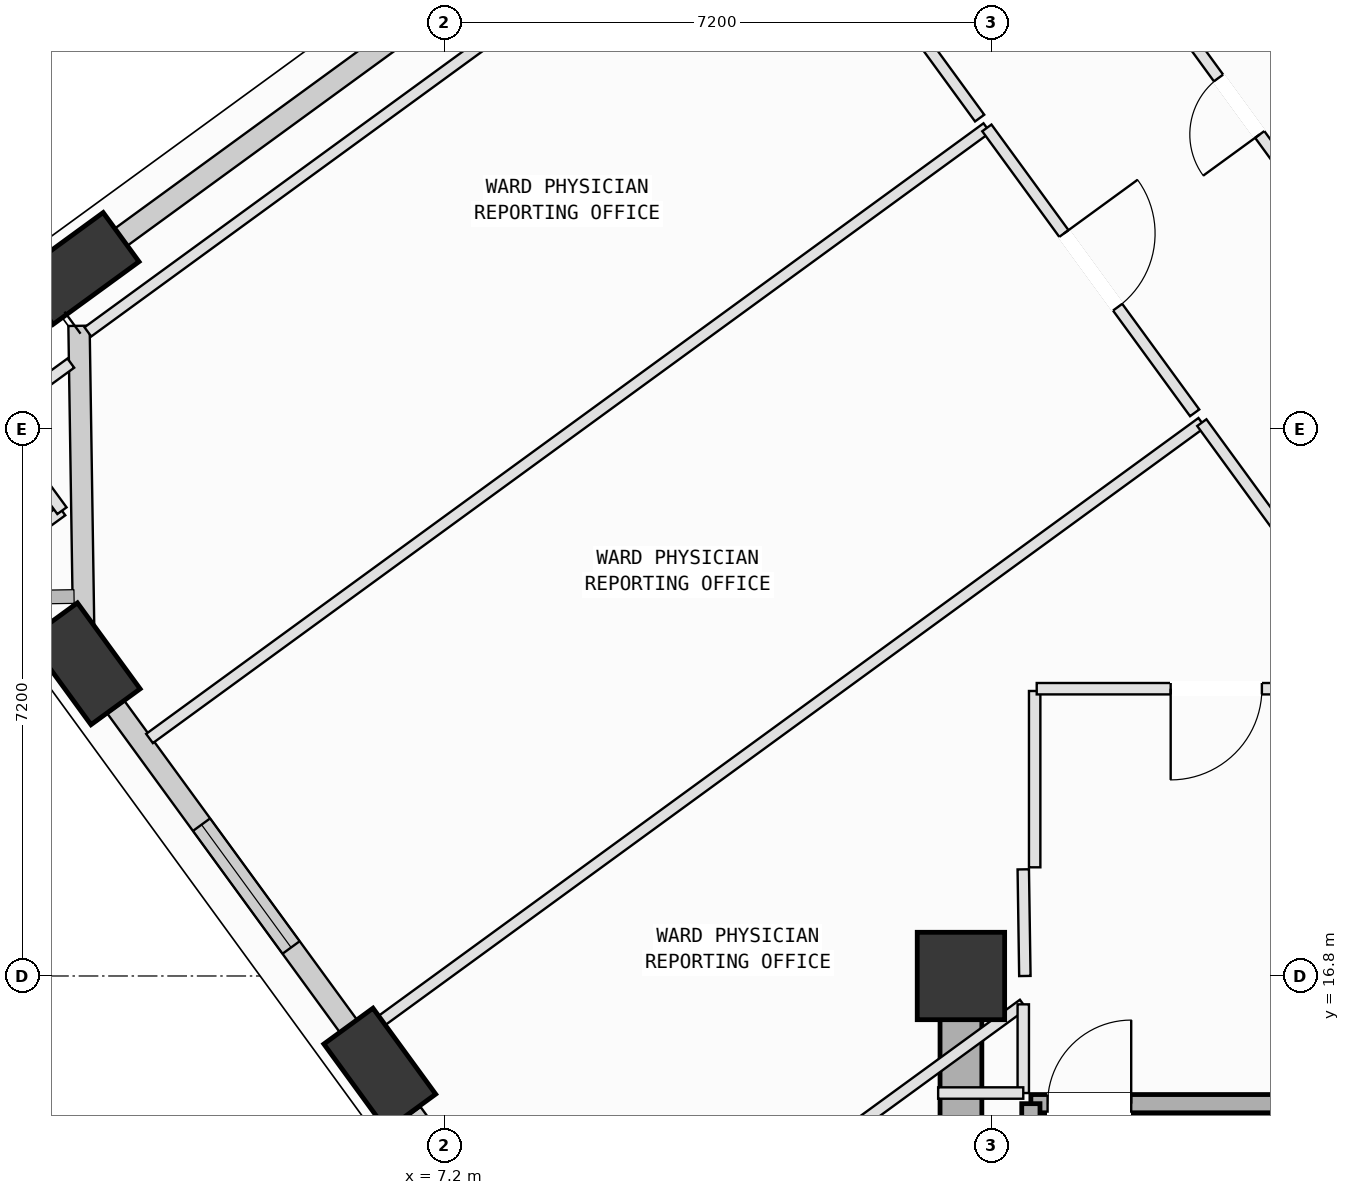
"""IFC4 building model, lengths in metres.
Left out: names, types, materials, properties, quantities, classifications, styles, units other than length and angle.
Written with IfcOpenShell. Run it as: python <this file> out.ifc"""

import sys

from ifc_helpers import new_model, si_unit, direction, frame, frame_2d, origin, origin_2d, place, context, subcontext, project, spatial, rectangle, extrude, element, fill, save


model = new_model("IFC4")
c1 = context("Model", 3, precision=1e-05, world=origin(), true_north=direction((0.0, 1.0)))
c2 = subcontext(c1, "Body", "Model", "MODEL_VIEW")
j1 = project(units=[si_unit("LENGTHUNIT", "METRE"), si_unit("PLANEANGLEUNIT", "RADIAN")], contexts=[c1])
p1 = place(None, origin())
s1 = spatial("IfcSite", under=j1, at=p1, CompositionType="ELEMENT")
p2 = place(p1, origin())
s2 = spatial("IfcBuilding", under=s1, at=p2, CompositionType="ELEMENT")
p3 = place(p2, frame((0.0, 0.0, 177.8)))
s3 = spatial("IfcBuildingStorey", under=s2, at=p3, CompositionType="ELEMENT", Elevation=177.8)
p4 = place(p3, frame((14.0, 16.8, 0.0), z_axis=(0.0, 0.0, 1.0), x_axis=(1.0, 0.0, 0.0)))
e1 = element("IfcColumn", 1, at=p4, inside=s3, PredefinedType="COLUMN", context=c2, shape_type="SweptSolid", body=[
    extrude(rectangle(XDim=1.15, YDim=1.15, at=origin_2d()), origin(), (0.0, 0.0, 1.0), 4.0),
])
p5 = place(p3, frame((2.385, 26.109, 0.002), z_axis=(-0.004301534601, -0.128379603084, 0.991715772947), x_axis=(0.827104014737, 0.556929973682, 0.075683242671)))
e2 = element("IfcColumn", 2, at=p5, inside=s3, PredefinedType="COLUMN", context=c2, shape_type="SweptSolid", body=[
    extrude(rectangle(XDim=1.4, YDim=0.8, at=origin_2d()), origin(), (0.0, 0.0, 1.0), 4.03),
])
p6 = place(p3, frame((2.465, 20.908, 0.002), z_axis=(0.017083826497, -0.127825794003, 0.991649489114), x_axis=(-0.690145428743, 0.716129588878, 0.104200283673)))
e3 = element("IfcColumn", 3, at=p6, inside=s3, PredefinedType="COLUMN", context=c2, shape_type="SweptSolid", body=[
    extrude(rectangle(XDim=1.4, YDim=0.8, at=origin_2d()), origin(), (0.0, 0.0, 1.0), 4.03),
])
p7 = place(p3, frame((6.354, 15.575, 0.002), z_axis=(0.03888408662, -0.111799331733, 0.992969756454), x_axis=(-0.820057422321, 0.564232872721, 0.095640417382)))
e4 = element("IfcColumn", 4, at=p7, inside=s3, PredefinedType="COLUMN", context=c2, shape_type="SweptSolid", body=[
    extrude(rectangle(XDim=1.4, YDim=0.8, at=origin_2d()), origin(), (0.0, 0.0, 1.0), 4.025),
])
p8 = place(p3, frame((17.236, 32.747, 0.0), z_axis=(0.0, 0.0, 1.0), x_axis=(0.589164046523, -0.808013444371, 0.0)))
e5 = element("IfcWall", 5, at=p8, inside=s3, PredefinedType="SOLIDWALL", context=c2, shape_type="SweptSolid", body=[
    extrude(rectangle(XDim=6.96, YDim=0.24, at=frame_2d((3.48, 0.0))), origin(), (0.0, 0.0, 1.0), 3.265),
])
p9 = place(p8, frame((3.152, 0.0, 0.0)))
e6 = element("IfcOpeningElement", 6, at=p9, cuts=e5, PredefinedType="OPENING", context=c2, shape_type="SweptSolid", body=[
    extrude(rectangle(XDim=1.1, YDim=2.15, at=frame_2d((0.55, 1.075))), frame((0.0, 0.13, 0.0), z_axis=(0.0, -1.0, 0.0), x_axis=(1.0, 0.0, 0.0)), (0.0, 0.0, 1.0), 0.26),
])
p10 = place(p3, frame((2.621, 26.282, 0.0), z_axis=(0.0, 0.0, 1.0), x_axis=(0.807987546016, 0.589199563377, 0.0)))
e7 = element("IfcWall", 7, at=p10, inside=s3, PredefinedType="SOLIDWALL", context=c2, shape_type="SweptSolid", body=[
    extrude(rectangle(XDim=7.27, YDim=0.28, at=frame_2d((3.635, 0.0))), origin(), (0.0, 0.0, 1.0), 3.265),
])
p11 = place(p3, frame((2.461, 21.145, 0.0), z_axis=(0.0, 0.0, 1.0), x_axis=(-0.015365849783, 0.999881938361, 0.0)))
e8 = element("IfcWall", 8, at=p11, inside=s3, PredefinedType="SOLIDWALL", context=c2, shape_type="SweptSolid", body=[
    extrude(rectangle(XDim=4.21, YDim=0.28, at=frame_2d((2.105, 0.0))), origin(), (0.0, 0.0, 1.0), 3.265),
])
p12 = place(p3, frame((6.198, 15.788, 0.0), z_axis=(0.0, 0.0, 1.0), x_axis=(-0.589159176224, 0.808016995534, 0.0)))
e9 = element("IfcWall", 9, at=p12, inside=s3, PredefinedType="SOLIDWALL", context=c2, shape_type="SweptSolid", body=[
    extrude(rectangle(XDim=5.628, YDim=0.28, at=frame_2d((2.814, 0.0))), origin(), (0.0, 0.0, 1.0), 3.265),
])
p13 = place(p12, frame((1.717, 0.0, 0.75)))
e10 = element("IfcOpeningElement", 10, at=p13, cuts=e9, PredefinedType="OPENING", context=c2, shape_type="SweptSolid", body=[
    extrude(rectangle(XDim=2.0, YDim=1.95, at=frame_2d((1.0, 0.975))), frame((0.0, 0.15, 0.0), z_axis=(0.0, -1.0, 0.0), x_axis=(1.0, 0.0, 0.0)), (0.0, 0.0, 1.0), 0.3),
])
p14 = place(p3, frame((10.114, 10.419, 0.0), z_axis=(0.0, 0.0, 1.0), x_axis=(-0.589176262837, 0.808004536688, 0.0)))
e11 = element("IfcWall", 11, at=p14, inside=s3, PredefinedType="SOLIDWALL", context=c2, shape_type="SweptSolid", body=[
    extrude(rectangle(XDim=5.662, YDim=0.28, at=frame_2d((2.831, 0.0))), origin(), (0.0, 0.0, 1.0), 3.265),
])
p15 = place(p14, frame((3.356, 0.0, 0.75)))
e12 = element("IfcOpeningElement", 12, at=p15, cuts=e11, PredefinedType="OPENING", context=c2, shape_type="SweptSolid", body=[
    extrude(rectangle(XDim=1.4, YDim=1.85, at=frame_2d((0.7, 0.925))), frame((0.0, 0.15, 0.0), z_axis=(0.0, -1.0, 0.0), x_axis=(1.0, 0.0, 0.0)), (0.0, 0.0, 1.0), 0.3),
])
p16 = place(p3, frame((14.92, 15.12, 0.0), z_axis=(0.0, 0.0, 1.0), x_axis=(1.0, 0.0, 0.0)))
e13 = element("IfcWall", 13, at=p16, inside=s3, PredefinedType="SOLIDWALL", context=c2, shape_type="SweptSolid", body=[
    extrude(rectangle(XDim=3.46, YDim=0.24, at=frame_2d((1.73, 0.0))), origin(), (0.0, 0.0, 1.0), 3.78),
])
p17 = place(p16, frame((0.22, 0.0, 0.0)))
e14 = element("IfcOpeningElement", 14, at=p17, cuts=e13, PredefinedType="OPENING", context=c2, shape_type="SweptSolid", body=[
    extrude(rectangle(XDim=1.1, YDim=2.15, at=frame_2d((0.55, 1.075))), frame((0.0, 0.13, 0.0), z_axis=(0.0, -1.0, 0.0), x_axis=(1.0, 0.0, 0.0)), (0.0, 0.0, 1.0), 0.26),
])
p18 = place(p3, frame((14.92, 8.075, 0.0), z_axis=(0.0, 0.0, 1.0), x_axis=(0.0, 1.0, 0.0)))
e15 = element("IfcWall", 15, at=p18, inside=s3, PredefinedType="SOLIDWALL", context=c2, shape_type="SweptSolid", body=[
    extrude(rectangle(XDim=7.045, YDim=0.24, at=frame_2d((3.522, 0.0))), origin(), (0.0, 0.0, 1.0), 3.78),
])
p19 = place(p3, frame((14.0, 16.8, 0.0), z_axis=(0.0, 0.0, 1.0), x_axis=(0.0, -1.0, 0.0)))
e16 = element("IfcWall", 16, at=p19, inside=s3, PredefinedType="SHEAR", context=c2, shape_type="SweptSolid", body=[
    extrude(rectangle(XDim=9.0, YDim=0.55, at=frame_2d((4.5, 0.0))), origin(), (0.0, 0.0, 1.0), 3.78),
])
p20 = place(p3, frame((8.98, 12.169, 0.0), z_axis=(0.0, 0.0, 1.0), x_axis=(0.808029975649, 0.58914137391, 0.0)))
e17 = element("IfcWall", 17, at=p20, inside=s3, PredefinedType="PARTITIONING", context=c2, shape_type="SweptSolid", body=[
    extrude(rectangle(XDim=7.228, YDim=0.15, at=frame_2d((3.614, 0.0))), origin(), (0.0, 0.0, 1.0), 3.78),
])
p21 = place(p20, frame((3.114, 0.0, 0.0)))
e18 = element("IfcOpeningElement", 18, at=p21, cuts=e17, PredefinedType="OPENING", context=c2, shape_type="SweptSolid", body=[
    extrude(rectangle(XDim=1.0, YDim=2.12, at=frame_2d((0.5, 1.06))), frame((0.0, 0.085, 0.0), z_axis=(0.0, -1.0, 0.0), x_axis=(1.0, 0.0, 0.0)), (0.0, 0.0, 1.0), 0.17),
])
p22 = place(p3, frame((14.82, 16.427, 0.0), z_axis=(0.0, 0.0, 1.0), x_axis=(0.0, -1.0, 0.0)))
e19 = element("IfcWall", 19, at=p22, inside=s3, PredefinedType="PARTITIONING", context=c2, shape_type="SweptSolid", body=[
    extrude(rectangle(XDim=1.167, YDim=0.15, at=frame_2d((0.583, 0.0))), origin(), (0.0, 0.0, 1.0), 3.78),
])
p23 = place(p3, frame((14.82, 15.26, 0.0), z_axis=(0.0, 0.0, 1.0), x_axis=(-1.0, 0.0, 0.0)))
e20 = element("IfcWall", 20, at=p23, inside=s3, PredefinedType="PARTITIONING", context=c2, shape_type="SweptSolid", body=[
    extrude(rectangle(XDim=1.12, YDim=0.15, at=frame_2d((0.56, 0.0))), origin(), (0.0, 0.0, 1.0), 3.78),
])
p24 = place(p3, frame((14.97, 20.55, 0.0), z_axis=(0.0, 0.0, 1.0), x_axis=(0.0, -1.0, 0.0)))
e21 = element("IfcWall", 21, at=p24, inside=s3, PredefinedType="PARTITIONING", context=c2, shape_type="SweptSolid", body=[
    extrude(rectangle(XDim=2.32, YDim=0.15, at=frame_2d((1.16, 0.0))), origin(), (0.0, 0.0, 1.0), 3.78),
])
p25 = place(p3, frame((14.82, 18.203, 0.0), z_axis=(0.0, 0.0, 1.0), x_axis=(0.014965257436, -0.999888014265, 0.0)))
e22 = element("IfcWall", 22, at=p25, inside=s3, PredefinedType="PARTITIONING", context=c2, shape_type="SweptSolid", body=[
    extrude(rectangle(XDim=1.403, YDim=0.15, at=frame_2d((0.702, 0.0))), origin(), (0.0, 0.0, 1.0), 3.78),
])
p26 = place(p3, frame((6.592, 14.858, 0.0), z_axis=(0.0, 0.0, 1.0), x_axis=(-0.589175535911, 0.808005066744, 0.0)))
e23 = element("IfcWall", 23, at=p26, inside=s3, PredefinedType="PARTITIONING", context=c2, shape_type="SweptSolid", body=[
    extrude(rectangle(XDim=0.983, YDim=0.15, at=frame_2d((0.491, 0.0))), origin(), (0.0, 0.0, 1.0), 3.265),
])
p27 = place(p3, frame((6.152, 16.047, 0.0), z_axis=(0.0, 0.0, 1.0), x_axis=(0.807978938545, 0.589211366886, 0.0)))
e24 = element("IfcWall", 24, at=p27, inside=s3, PredefinedType="PARTITIONING", context=c2, shape_type="SweptSolid", body=[
    extrude(rectangle(XDim=13.635, YDim=0.15, at=frame_2d((6.817, 0.0))), origin(), (0.0, 0.0, 1.0), 3.78),
])
p28 = place(p3, frame((17.169, 24.081, 0.0), z_axis=(0.0, 0.0, 1.0), x_axis=(0.589199746841, -0.807987412231, 0.0)))
e25 = element("IfcWall", 25, at=p28, inside=s3, PredefinedType="PARTITIONING", context=c2, shape_type="SweptSolid", body=[
    extrude(rectangle(XDim=4.333, YDim=0.15, at=frame_2d((2.167, 0.0))), origin(), (0.0, 0.0, 1.0), 3.78),
])
p29 = place(p3, frame((19.722, 20.58, 0.0), z_axis=(0.0, 0.0, 1.0), x_axis=(-1.0, 0.0, 0.0)))
e26 = element("IfcWall", 26, at=p29, inside=s3, PredefinedType="PARTITIONING", context=c2, shape_type="SweptSolid", body=[
    extrude(rectangle(XDim=4.725, YDim=0.15, at=frame_2d((2.362, 0.0))), origin(), (0.0, 0.0, 1.0), 3.78),
])
p30 = place(p29, frame((1.762, 0.0, 0.0)))
e27 = element("IfcOpeningElement", 27, at=p30, cuts=e26, PredefinedType="OPENING", context=c2, shape_type="SweptSolid", body=[
    extrude(rectangle(XDim=1.2, YDim=2.15, at=frame_2d((0.6, 1.075))), frame((0.0, 0.085, 0.0), z_axis=(0.0, -1.0, 0.0), x_axis=(1.0, 0.0, 0.0)), (0.0, 0.0, 1.0), 0.17),
])
p31 = place(p3, frame((3.324, 19.925, 0.0), z_axis=(0.0, 0.0, 1.0), x_axis=(0.807985154612, 0.589202842769, 0.0)))
e28 = element("IfcWall", 28, at=p31, inside=s3, PredefinedType="PARTITIONING", context=c2, shape_type="SweptSolid", body=[
    extrude(rectangle(XDim=13.635, YDim=0.15, at=frame_2d((6.818, 0.0))), origin(), (0.0, 0.0, 1.0), 3.78),
])
p32 = place(p3, frame((14.341, 27.959, 0.0), z_axis=(0.0, 0.0, 1.0), x_axis=(0.589203646607, -0.807984568432, 0.0)))
e29 = element("IfcWall", 29, at=p32, inside=s3, PredefinedType="PARTITIONING", context=c2, shape_type="SweptSolid", body=[
    extrude(rectangle(XDim=4.64, YDim=0.15, at=frame_2d((2.32, 0.0))), origin(), (0.0, 0.0, 1.0), 3.78),
])
p33 = place(p32, frame((1.72, 0.0, 0.0)))
e30 = element("IfcOpeningElement", 30, at=p33, cuts=e29, PredefinedType="OPENING", context=c2, shape_type="SweptSolid", body=[
    extrude(rectangle(XDim=1.2, YDim=2.15, at=frame_2d((0.6, 1.075))), frame((0.0, 0.085, 0.0), z_axis=(0.0, -1.0, 0.0), x_axis=(1.0, 0.0, 0.0)), (0.0, 0.0, 1.0), 0.17),
])
p34 = place(p3, frame((2.513, 25.275, 0.0), z_axis=(0.0, 0.0, 1.0), x_axis=(0.808028399197, 0.589143536068, 0.0)))
e31 = element("IfcWall", 31, at=p34, inside=s3, PredefinedType="PARTITIONING", context=c2, shape_type="SweptSolid", body=[
    extrude(rectangle(XDim=11.138, YDim=0.15, at=frame_2d((5.569, 0.0))), origin(), (0.0, 0.0, 1.0), 3.265),
])
p35 = place(p3, frame((11.513, 31.837, 0.0), z_axis=(0.0, 0.0, 1.0), x_axis=(0.589100581197, -0.808059716378, 0.0)))
e32 = element("IfcWall", 32, at=p35, inside=s3, PredefinedType="PARTITIONING", context=c2, shape_type="SweptSolid", body=[
    extrude(rectangle(XDim=4.64, YDim=0.15, at=frame_2d((2.32, 0.0))), origin(), (0.0, 0.0, 1.0), 3.78),
])
p36 = place(p35, frame((1.72, 0.0, 0.0)))
e33 = element("IfcOpeningElement", 33, at=p36, cuts=e32, PredefinedType="OPENING", context=c2, shape_type="SweptSolid", body=[
    extrude(rectangle(XDim=1.2, YDim=2.15, at=frame_2d((0.6, 1.075))), frame((0.0, 0.085, 0.0), z_axis=(0.0, -1.0, 0.0), x_axis=(1.0, 0.0, 0.0)), (0.0, 0.0, 1.0), 0.17),
])
p37 = place(p3, frame((2.697, 20.2, 0.0), z_axis=(0.0, 0.0, 1.0), x_axis=(-0.589154949726, 0.808020077234, 0.0)))
e34 = element("IfcWall", 34, at=p37, inside=s3, PredefinedType="PARTITIONING", context=c2, shape_type="SweptSolid", body=[
    extrude(rectangle(XDim=2.509, YDim=0.15, at=frame_2d((1.254, 0.0))), origin(), (0.0, 0.0, 1.0), 3.265),
])
p38 = place(p3, frame((1.219, 22.227, 0.0), z_axis=(0.0, 0.0, 1.0), x_axis=(0.80797468736, 0.589217196443, 0.0)))
e35 = element("IfcWall", 35, at=p38, inside=s3, PredefinedType="PARTITIONING", context=c2, shape_type="SweptSolid", body=[
    extrude(rectangle(XDim=1.18, YDim=0.15, at=frame_2d((0.59, 0.0))), origin(), (0.0, 0.0, 1.0), 3.78),
])
p39 = place(p3, frame((2.172, 22.922, 0.0), z_axis=(0.0, 0.0, 1.0), x_axis=(-0.589322677246, 0.807897754722, 0.0)))
e36 = element("IfcWall", 36, at=p39, inside=s3, PredefinedType="PARTITIONING", context=c2, shape_type="SweptSolid", body=[
    extrude(rectangle(XDim=1.5, YDim=0.15, at=frame_2d((0.75, 0.0))), origin(), (0.0, 0.0, 1.0), 3.78),
])
p40 = place(p3, frame((1.288, 24.134, 0.0), z_axis=(0.0, 0.0, 1.0), x_axis=(0.807968439225, 0.589225764216, 0.0)))
e37 = element("IfcWall", 37, at=p40, inside=s3, PredefinedType="PARTITIONING", context=c2, shape_type="SweptSolid", body=[
    extrude(rectangle(XDim=1.239, YDim=0.15, at=frame_2d((0.619, 0.0))), origin(), (0.0, 0.0, 1.0), 3.78),
])
p41 = place(p3, frame((17.987, 29.765, 0.0), z_axis=(0.0, 0.0, 1.0), x_axis=(0.589263942503, -0.807940595629, 0.0)))
e38 = element("IfcWall", 38, at=p41, inside=s3, PredefinedType="PARTITIONING", context=c2, shape_type="SweptSolid", body=[
    extrude(rectangle(XDim=1.7, YDim=0.15, at=frame_2d((0.85, 0.0))), origin(), (0.0, 0.0, 1.0), 3.78),
])
p42 = place(p3, frame((19.171, 26.172, 0.0), z_axis=(0.0, 0.0, 1.0), x_axis=(-0.589139140752, 0.808031603858, 0.0)))
e39 = element("IfcWall", 39, at=p42, inside=s3, PredefinedType="PARTITIONING", context=c2, shape_type="SweptSolid", body=[
    extrude(rectangle(XDim=5.129, YDim=0.15, at=frame_2d((2.565, 0.0))), origin(), (0.0, 0.0, 1.0), 3.78),
])
p43 = place(p42, frame((2.105, 0.0, 0.0)))
e40 = element("IfcOpeningElement", 40, at=p43, cuts=e39, PredefinedType="OPENING", context=c2, shape_type="SweptSolid", body=[
    extrude(rectangle(XDim=0.92, YDim=2.1, at=frame_2d((0.46, 1.05))), frame((0.0, 0.085, 0.0), z_axis=(0.0, -1.0, 0.0), x_axis=(1.0, 0.0, 0.0)), (0.0, 0.0, 1.0), 0.17),
])
p44 = place(p13, origin())
e41 = element("IfcWindow", 41, at=p44, inside=s3, PartitioningType="SINGLE_PANEL", PredefinedType="WINDOW", context=c2, shape_type="SweptSolid", body=[
    extrude(rectangle(XDim=2.0, YDim=1.95, at=frame_2d((1.0, 0.975))), frame((0.0, 0.03, 0.0), z_axis=(0.0, -1.0, 0.0), x_axis=(1.0, 0.0, 0.0)), (0.0, 0.0, 1.0), 0.06),
])
fill(e10, e41)
p45 = place(p17, origin())
e42 = element("IfcDoor", 42, at=p45, inside=s3, OperationType="SINGLE_SWING_RIGHT", PredefinedType="DOOR", context=c2, shape_type="SweptSolid", body=[
    extrude(rectangle(XDim=1.1, YDim=2.15, at=frame_2d((0.55, 1.075))), frame((0.0, 0.025, 0.0), z_axis=(0.0, -1.0, 0.0), x_axis=(1.0, 0.0, 0.0)), (0.0, 0.0, 1.0), 0.05),
])
fill(e14, e42)
p46 = place(p30, origin())
e43 = element("IfcDoor", 43, at=p46, inside=s3, OperationType="SINGLE_SWING_RIGHT", PredefinedType="DOOR", context=c2, shape_type="SweptSolid", body=[
    extrude(rectangle(XDim=1.2, YDim=2.15, at=frame_2d((0.6, 1.075))), frame((0.0, 0.025, 0.0), z_axis=(0.0, -1.0, 0.0), x_axis=(1.0, 0.0, 0.0)), (0.0, 0.0, 1.0), 0.05),
])
fill(e27, e43)
p47 = place(p33, origin())
e44 = element("IfcDoor", 44, at=p47, inside=s3, OperationType="SINGLE_SWING_LEFT", PredefinedType="DOOR", context=c2, shape_type="SweptSolid", body=[
    extrude(rectangle(XDim=1.2, YDim=2.15, at=frame_2d((0.6, 1.075))), frame((0.0, 0.025, 0.0), z_axis=(0.0, -1.0, 0.0), x_axis=(1.0, 0.0, 0.0)), (0.0, 0.0, 1.0), 0.05),
])
fill(e30, e44)
p48 = place(p43, origin())
e45 = element("IfcDoor", 45, at=p48, inside=s3, OperationType="SINGLE_SWING_LEFT", PredefinedType="DOOR", context=c2, shape_type="SweptSolid", body=[
    extrude(rectangle(XDim=0.92, YDim=2.1, at=frame_2d((0.46, 1.05))), frame((0.0, 0.025, 0.0), z_axis=(0.0, -1.0, 0.0), x_axis=(1.0, 0.0, 0.0)), (0.0, 0.0, 1.0), 0.05),
])
fill(e40, e45)
save(model, sys.argv[1])
